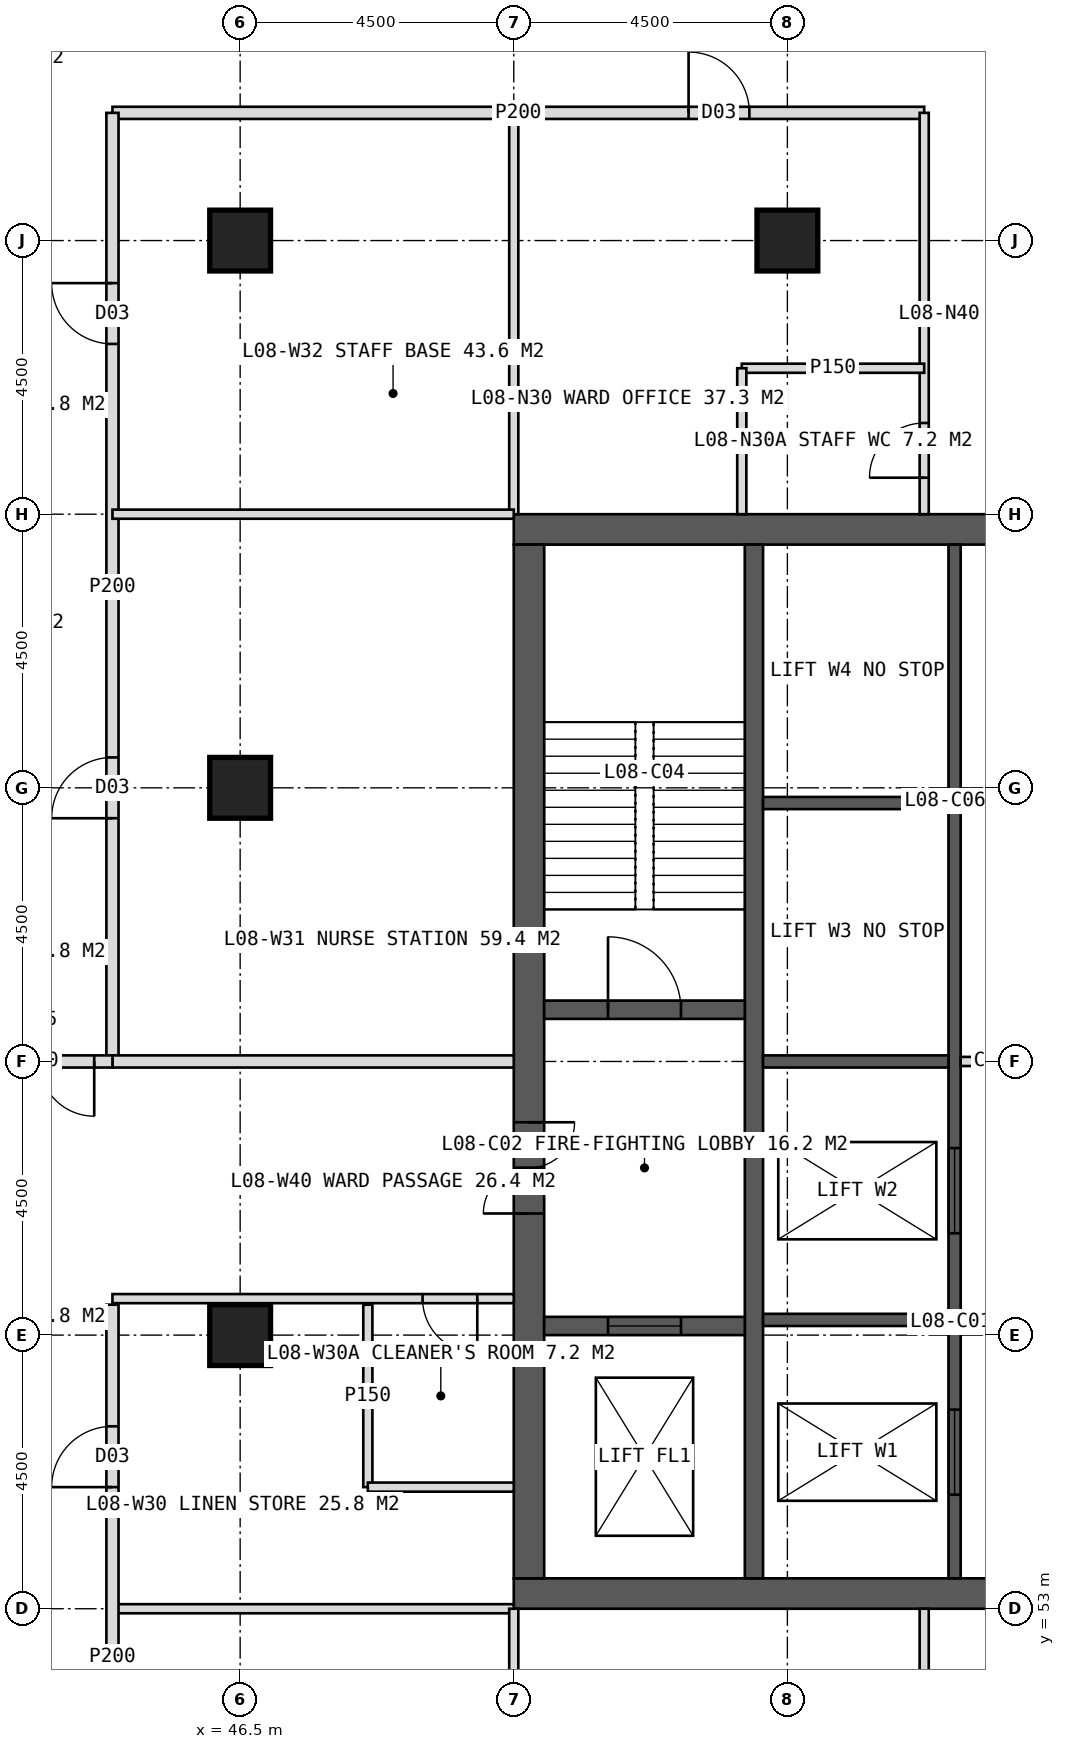
"""IFC4 building model, lengths in metres.
Left out: names, types, materials, properties, quantities, classifications, styles, units other than length and angle.
Written with IfcOpenShell. Run it as: python <this file> out.ifc"""

import sys

from ifc_helpers import new_model, si_unit, direction, frame, frame_2d, origin, origin_2d, place, context, subcontext, project, spatial, rectangle, hollow_rectangle, extrude, element, fill, save


model = new_model("IFC4")
c1 = context("Model", 3, precision=1e-05, world=origin(), true_north=direction((0.0, 1.0)))
c2 = subcontext(c1, "Body", "Model", "MODEL_VIEW")
j1 = project(units=[si_unit("LENGTHUNIT", "METRE"), si_unit("PLANEANGLEUNIT", "RADIAN")], contexts=[c1])
p1 = place(None, origin())
s1 = spatial("IfcSite", under=j1, at=p1, CompositionType="ELEMENT")
p2 = place(p1, origin())
s2 = spatial("IfcBuilding", under=s1, at=p2, CompositionType="ELEMENT")
p3 = place(p2, frame((0.0, 0.0, 39.0)))
s3 = spatial("IfcBuildingStorey", under=s2, at=p3, CompositionType="ELEMENT", Elevation=39.0)
p4 = place(p3, frame((51.0, 70.75, 0.0), z_axis=(0.0, 0.0, 1.0), x_axis=(1.0, 0.0, 0.0)))
e1 = element("IfcWall", 1, at=p4, inside=s3, PredefinedType="SHEAR", context=c2, shape_type="SweptSolid", body=[
    extrude(rectangle(XDim=18.0, YDim=0.5, at=frame_2d((9.0, 0.0))), origin(), (0.0, 0.0, 1.0), 4.0),
])
p5 = place(p4, frame((8.1, 0.0, 0.0)))
e2 = element("IfcOpeningElement", 2, at=p5, cuts=e1, PredefinedType="OPENING", context=c2, shape_type="SweptSolid", body=[
    extrude(rectangle(XDim=1.8, YDim=2.2, at=frame_2d((0.9, 1.1))), frame((0.0, 0.26, 0.0), z_axis=(0.0, -1.0, 0.0), x_axis=(1.0, 0.0, 0.0)), (0.0, 0.0, 1.0), 0.52),
])
p6 = place(p3, frame((51.0, 53.25, 0.0), z_axis=(0.0, 0.0, 1.0), x_axis=(1.0, 0.0, 0.0)))
e3 = element("IfcWall", 3, at=p6, inside=s3, PredefinedType="SHEAR", context=c2, shape_type="SweptSolid", body=[
    extrude(rectangle(XDim=18.0, YDim=0.5, at=frame_2d((9.0, 0.0))), origin(), (0.0, 0.0, 1.0), 4.0),
])
p7 = place(p6, frame((8.1, 0.0, 0.0)))
e4 = element("IfcOpeningElement", 4, at=p7, cuts=e3, PredefinedType="OPENING", context=c2, shape_type="SweptSolid", body=[
    extrude(rectangle(XDim=1.8, YDim=2.2, at=frame_2d((0.9, 1.1))), frame((0.0, 0.26, 0.0), z_axis=(0.0, -1.0, 0.0), x_axis=(1.0, 0.0, 0.0)), (0.0, 0.0, 1.0), 0.52),
])
p8 = place(p3, frame((51.25, 53.5, 0.0), z_axis=(0.0, 0.0, 1.0), x_axis=(0.0, 1.0, 0.0)))
e5 = element("IfcWall", 5, at=p8, inside=s3, PredefinedType="SHEAR", context=c2, shape_type="SweptSolid", body=[
    extrude(rectangle(XDim=17.0, YDim=0.5, at=frame_2d((8.5, 0.0))), origin(), (0.0, 0.0, 1.0), 4.0),
])
p9 = place(p8, frame((6.0, 0.0, 0.0)))
e6 = element("IfcOpeningElement", 6, at=p9, cuts=e5, PredefinedType="OPENING", context=c2, shape_type="SweptSolid", body=[
    extrude(rectangle(XDim=1.5, YDim=2.2, at=frame_2d((0.75, 1.1))), frame((0.0, 0.26, 0.0), z_axis=(0.0, -1.0, 0.0), x_axis=(1.0, 0.0, 0.0)), (0.0, 0.0, 1.0), 0.52),
])
p10 = place(p3, frame((54.95, 53.5, 0.0), z_axis=(0.0, 0.0, 1.0), x_axis=(0.0, 1.0, 0.0)))
e7 = element("IfcWall", 7, at=p10, inside=s3, PredefinedType="SHEAR", context=c2, shape_type="SweptSolid", body=[
    extrude(rectangle(XDim=17.0, YDim=0.3, at=frame_2d((8.5, 0.0))), origin(), (0.0, 0.0, 1.0), 4.0),
])
p11 = place(p3, frame((58.25, 53.5, 0.0), z_axis=(0.0, 0.0, 1.0), x_axis=(0.0, 1.0, 0.0)))
e8 = element("IfcWall", 8, at=p11, inside=s3, PredefinedType="SHEAR", context=c2, shape_type="SweptSolid", body=[
    extrude(rectangle(XDim=17.0, YDim=0.2, at=frame_2d((8.5, 0.0))), origin(), (0.0, 0.0, 1.0), 4.0),
])
p12 = place(p11, frame((1.375, 0.0, 0.0)))
e9 = element("IfcOpeningElement", 9, at=p12, cuts=e8, PredefinedType="OPENING", context=c2, shape_type="SweptSolid", body=[
    extrude(rectangle(XDim=1.4, YDim=2.2, at=frame_2d((0.7, 1.1))), frame((0.0, 0.11, 0.0), z_axis=(0.0, -1.0, 0.0), x_axis=(1.0, 0.0, 0.0)), (0.0, 0.0, 1.0), 0.22),
])
p13 = place(p11, frame((5.675, 0.0, 0.0)))
e10 = element("IfcOpeningElement", 10, at=p13, cuts=e8, PredefinedType="OPENING", context=c2, shape_type="SweptSolid", body=[
    extrude(rectangle(XDim=1.4, YDim=2.2, at=frame_2d((0.7, 1.1))), frame((0.0, 0.11, 0.0), z_axis=(0.0, -1.0, 0.0), x_axis=(1.0, 0.0, 0.0)), (0.0, 0.0, 1.0), 0.22),
])
for number, where, z_axis, x_axis in (
    (11, (55.1, 57.75, 0.0), (0.0, 0.0, 1.0), (1.0, 0.0, 0.0)),
    (12, (55.1, 62.0, 0.0), (0.0, 0.0, 1.0), (1.0, 0.0, 0.0)),
    (13, (55.1, 66.25, 0.0), (0.0, 0.0, 1.0), (1.0, 0.0, 0.0)),
):
    element("IfcWall", number, at=place(p3, frame(where, z_axis=z_axis, x_axis=x_axis)), inside=s3, PredefinedType="SHEAR", context=c2, shape_type="SweptSolid", body=[
        extrude(rectangle(XDim=3.05, YDim=0.2, at=frame_2d((1.525, 0.0))), origin(), (0.0, 0.0, 1.0), 4.0),
    ])
p14 = place(p3, frame((51.5, 62.85, 0.0), z_axis=(0.0, 0.0, 1.0), x_axis=(1.0, 0.0, 0.0)))
e14 = element("IfcWall", 14, at=p14, inside=s3, PredefinedType="SHEAR", context=c2, shape_type="SweptSolid", body=[
    extrude(rectangle(XDim=3.3, YDim=0.3, at=frame_2d((1.65, 0.0))), origin(), (0.0, 0.0, 1.0), 4.0),
])
p15 = place(p14, frame((1.05, 0.0, 0.0)))
e15 = element("IfcOpeningElement", 15, at=p15, cuts=e14, PredefinedType="OPENING", context=c2, shape_type="SweptSolid", body=[
    extrude(rectangle(XDim=1.2, YDim=2.1, at=frame_2d((0.6, 1.05))), frame((0.0, 0.16, 0.0), z_axis=(0.0, -1.0, 0.0), x_axis=(1.0, 0.0, 0.0)), (0.0, 0.0, 1.0), 0.32),
])
p16 = place(p3, frame((51.5, 57.65, 0.0), z_axis=(0.0, 0.0, 1.0), x_axis=(1.0, 0.0, 0.0)))
e16 = element("IfcWall", 16, at=p16, inside=s3, PredefinedType="SHEAR", context=c2, shape_type="SweptSolid", body=[
    extrude(rectangle(XDim=3.3, YDim=0.3, at=frame_2d((1.65, 0.0))), origin(), (0.0, 0.0, 1.0), 4.0),
])
p17 = place(p16, frame((1.05, 0.0, 0.0)))
e17 = element("IfcOpeningElement", 17, at=p17, cuts=e16, PredefinedType="OPENING", context=c2, shape_type="SweptSolid", body=[
    extrude(rectangle(XDim=1.2, YDim=2.2, at=frame_2d((0.6, 1.1))), frame((0.0, 0.16, 0.0), z_axis=(0.0, -1.0, 0.0), x_axis=(1.0, 0.0, 0.0)), (0.0, 0.0, 1.0), 0.32),
])
for number, where, z_axis, x_axis in (
    (18, (46.5, 75.5, 0.0), (0.0, 0.0, 1.0), (1.0, 0.0, 0.0)),
    (19, (55.5, 75.5, 0.0), (0.0, 0.0, 1.0), (1.0, 0.0, 0.0)),
    (20, (46.5, 57.5, 0.0), (0.0, 0.0, 1.0), (1.0, 0.0, 0.0)),
    (21, (46.5, 66.5, 0.0), (0.0, 0.0, 1.0), (1.0, 0.0, 0.0)),
):
    element("IfcColumn", number, at=place(p3, frame(where, z_axis=z_axis, x_axis=x_axis)), inside=s3, PredefinedType="COLUMN", context=c2, shape_type="SweptSolid", body=[
        extrude(hollow_rectangle(XDim=1.0, YDim=1.0, WallThickness=0.1, at=origin_2d()), origin(), (0.0, 0.0, 1.0), 4.0),
    ])
p18 = place(p3, frame((51.0, 71.0, 0.0), z_axis=(0.0, 0.0, 1.0), x_axis=(0.0, 1.0, 0.0)))
e22 = element("IfcWall", 22, at=p18, inside=s3, PredefinedType="PARTITIONING", context=c2, shape_type="SweptSolid", body=[
    extrude(rectangle(XDim=6.6, YDim=0.15, at=frame_2d((3.3, 0.0))), origin(), (0.0, 0.0, 1.0), 3.75),
])
p19 = place(p3, frame((44.4, 77.6, 0.0), z_axis=(0.0, 0.0, 1.0), x_axis=(1.0, 0.0, 0.0)))
e23 = element("IfcWall", 23, at=p19, inside=s3, PredefinedType="PARTITIONING", context=c2, shape_type="SweptSolid", body=[
    extrude(rectangle(XDim=13.35, YDim=0.2, at=frame_2d((6.675, 0.0))), origin(), (0.0, 0.0, 1.0), 3.75),
])
p20 = place(p19, frame((9.475, 0.0, 0.0)))
e24 = element("IfcOpeningElement", 24, at=p20, cuts=e23, PredefinedType="OPENING", context=c2, shape_type="SweptSolid", body=[
    extrude(rectangle(XDim=1.0, YDim=2.1, at=frame_2d((0.5, 1.05))), frame((0.0, 0.11, 0.0), z_axis=(0.0, -1.0, 0.0), x_axis=(1.0, 0.0, 0.0)), (0.0, 0.0, 1.0), 0.22),
])
p21 = place(p3, frame((57.75, 71.0, 0.0), z_axis=(0.0, 0.0, 1.0), x_axis=(0.0, 1.0, 0.0)))
e25 = element("IfcWall", 25, at=p21, inside=s3, PredefinedType="PARTITIONING", context=c2, shape_type="SweptSolid", body=[
    extrude(rectangle(XDim=6.6, YDim=0.15, at=frame_2d((3.3, 0.0))), origin(), (0.0, 0.0, 1.0), 3.75),
])
p22 = place(p21, frame((0.6, 0.0, 0.0)))
e26 = element("IfcOpeningElement", 26, at=p22, cuts=e25, PredefinedType="OPENING", context=c2, shape_type="SweptSolid", body=[
    extrude(rectangle(XDim=0.9, YDim=2.1, at=frame_2d((0.45, 1.05))), frame((0.0, 0.085, 0.0), z_axis=(0.0, -1.0, 0.0), x_axis=(1.0, 0.0, 0.0)), (0.0, 0.0, 1.0), 0.17),
])
p23 = place(p3, frame((54.75, 73.4, 0.0), z_axis=(0.0, 0.0, 1.0), x_axis=(1.0, 0.0, 0.0)))
e27 = element("IfcWall", 27, at=p23, inside=s3, PredefinedType="PARTITIONING", context=c2, shape_type="SweptSolid", body=[
    extrude(rectangle(XDim=3.0, YDim=0.15, at=frame_2d((1.5, 0.0))), origin(), (0.0, 0.0, 1.0), 3.75),
])
p24 = place(p3, frame((54.75, 71.0, 0.0), z_axis=(0.0, 0.0, 1.0), x_axis=(0.0, 1.0, 0.0)))
e28 = element("IfcWall", 28, at=p24, inside=s3, PredefinedType="PARTITIONING", context=c2, shape_type="SweptSolid", body=[
    extrude(rectangle(XDim=2.4, YDim=0.15, at=frame_2d((1.2, 0.0))), origin(), (0.0, 0.0, 1.0), 3.75),
])
p25 = place(p3, frame((51.0, 53.0, 0.0), z_axis=(0.0, 0.0, 1.0), x_axis=(-1.0, 0.0, 0.0)))
e29 = element("IfcWall", 29, at=p25, inside=s3, PredefinedType="PARTITIONING", context=c2, shape_type="SweptSolid", body=[
    extrude(rectangle(XDim=6.6, YDim=0.15, at=frame_2d((3.3, 0.0))), origin(), (0.0, 0.0, 1.0), 3.75),
])
p26 = place(p3, frame((44.4, 46.4, 0.0), z_axis=(0.0, 0.0, 1.0), x_axis=(0.0, 1.0, 0.0)))
e30 = element("IfcWall", 30, at=p26, inside=s3, PredefinedType="PARTITIONING", context=c2, shape_type="SweptSolid", body=[
    extrude(rectangle(XDim=11.6, YDim=0.2, at=frame_2d((5.8, 0.0))), origin(), (0.0, 0.0, 1.0), 3.75),
])
p27 = place(p26, frame((8.6, 0.0, 0.0)))
e31 = element("IfcOpeningElement", 31, at=p27, cuts=e30, PredefinedType="OPENING", context=c2, shape_type="SweptSolid", body=[
    extrude(rectangle(XDim=1.0, YDim=2.1, at=frame_2d((0.5, 1.05))), frame((0.0, 0.11, 0.0), z_axis=(0.0, -1.0, 0.0), x_axis=(1.0, 0.0, 0.0)), (0.0, 0.0, 1.0), 0.22),
])
p28 = place(p3, frame((44.4, 62.0, 0.0), z_axis=(0.0, 0.0, 1.0), x_axis=(0.0, 1.0, 0.0)))
e32 = element("IfcWall", 32, at=p28, inside=s3, PredefinedType="PARTITIONING", context=c2, shape_type="SweptSolid", body=[
    extrude(rectangle(XDim=15.6, YDim=0.2, at=frame_2d((7.8, 0.0))), origin(), (0.0, 0.0, 1.0), 3.75),
])
p29 = place(p28, frame((4.0, 0.0, 0.0)))
e33 = element("IfcOpeningElement", 33, at=p29, cuts=e32, PredefinedType="OPENING", context=c2, shape_type="SweptSolid", body=[
    extrude(rectangle(XDim=1.0, YDim=2.1, at=frame_2d((0.5, 1.05))), frame((0.0, 0.11, 0.0), z_axis=(0.0, -1.0, 0.0), x_axis=(1.0, 0.0, 0.0)), (0.0, 0.0, 1.0), 0.22),
])
p30 = place(p28, frame((11.8, 0.0, 0.0)))
e34 = element("IfcOpeningElement", 34, at=p30, cuts=e32, PredefinedType="OPENING", context=c2, shape_type="SweptSolid", body=[
    extrude(rectangle(XDim=1.0, YDim=2.1, at=frame_2d((0.5, 1.05))), frame((0.0, 0.11, 0.0), z_axis=(0.0, -1.0, 0.0), x_axis=(1.0, 0.0, 0.0)), (0.0, 0.0, 1.0), 0.22),
])
p31 = place(p3, frame((51.0, 58.1, 0.0), z_axis=(0.0, 0.0, 1.0), x_axis=(-1.0, 0.0, 0.0)))
e35 = element("IfcWall", 35, at=p31, inside=s3, PredefinedType="PARTITIONING", context=c2, shape_type="SweptSolid", body=[
    extrude(rectangle(XDim=6.6, YDim=0.15, at=frame_2d((3.3, 0.0))), origin(), (0.0, 0.0, 1.0), 3.75),
])
p32 = place(p31, frame((0.6, 0.0, 0.0)))
e36 = element("IfcOpeningElement", 36, at=p32, cuts=e35, PredefinedType="OPENING", context=c2, shape_type="SweptSolid", body=[
    extrude(rectangle(XDim=0.9, YDim=2.1, at=frame_2d((0.45, 1.05))), frame((0.0, 0.085, 0.0), z_axis=(0.0, -1.0, 0.0), x_axis=(1.0, 0.0, 0.0)), (0.0, 0.0, 1.0), 0.17),
])
p33 = place(p3, frame((51.0, 62.0, 0.0), z_axis=(0.0, 0.0, 1.0), x_axis=(-1.0, 0.0, 0.0)))
e37 = element("IfcWall", 37, at=p33, inside=s3, PredefinedType="SOLIDWALL", context=c2, shape_type="SweptSolid", body=[
    extrude(rectangle(XDim=6.6, YDim=0.2, at=frame_2d((3.3, 0.0))), origin(), (0.0, 0.0, 1.0), 2.75),
])
p34 = place(p3, frame((51.0, 71.0, 0.0), z_axis=(0.0, 0.0, 1.0), x_axis=(-1.0, 0.0, 0.0)))
e38 = element("IfcWall", 38, at=p34, inside=s3, PredefinedType="PARTITIONING", context=c2, shape_type="SweptSolid", body=[
    extrude(rectangle(XDim=6.6, YDim=0.15, at=frame_2d((3.3, 0.0))), origin(), (0.0, 0.0, 1.0), 3.75),
])
p35 = place(p3, frame((48.6, 55.0, 0.0), z_axis=(0.0, 0.0, 1.0), x_axis=(0.0, 1.0, 0.0)))
e39 = element("IfcWall", 39, at=p35, inside=s3, PredefinedType="PARTITIONING", context=c2, shape_type="SweptSolid", body=[
    extrude(rectangle(XDim=3.0, YDim=0.15, at=frame_2d((1.5, 0.0))), origin(), (0.0, 0.0, 1.0), 3.75),
])
p36 = place(p3, frame((51.0, 55.0, 0.0), z_axis=(0.0, 0.0, 1.0), x_axis=(-1.0, 0.0, 0.0)))
e40 = element("IfcWall", 40, at=p36, inside=s3, PredefinedType="PARTITIONING", context=c2, shape_type="SweptSolid", body=[
    extrude(rectangle(XDim=2.4, YDim=0.15, at=frame_2d((1.2, 0.0))), origin(), (0.0, 0.0, 1.0), 3.75),
])
for number, where, z_axis, x_axis in (
    (41, (57.75, 53.0, 0.0), (0.0, 0.0, 1.0), (0.0, -1.0, 0.0)),
    (42, (51.0, 53.0, 0.0), (0.0, 0.0, 1.0), (0.0, -1.0, 0.0)),
):
    element("IfcWall", number, at=place(p3, frame(where, z_axis=z_axis, x_axis=x_axis)), inside=s3, PredefinedType="PARTITIONING", context=c2, shape_type="SweptSolid", body=[
        extrude(rectangle(XDim=6.6, YDim=0.15, at=frame_2d((3.3, 0.0))), origin(), (0.0, 0.0, 1.0), 3.75),
    ])
p37 = place(p3, frame((44.4, 62.0, 0.0), z_axis=(0.0, 0.0, 1.0), x_axis=(-1.0, 0.0, 0.0)))
e43 = element("IfcWall", 43, at=p37, inside=s3, PredefinedType="SOLIDWALL", context=c2, shape_type="SweptSolid", body=[
    extrude(rectangle(XDim=2.7, YDim=0.2, at=frame_2d((1.35, 0.0))), origin(), (0.0, 0.0, 1.0), 2.75),
])
p38 = place(p37, frame((0.3, 0.0, 0.0)))
e44 = element("IfcOpeningElement", 44, at=p38, cuts=e43, PredefinedType="OPENING", context=c2, shape_type="SweptSolid", body=[
    extrude(rectangle(XDim=1.8, YDim=2.2, at=frame_2d((0.9, 1.1))), frame((0.0, 0.11, 0.0), z_axis=(0.0, -1.0, 0.0), x_axis=(1.0, 0.0, 0.0)), (0.0, 0.0, 1.0), 0.22),
])
p39 = place(p3, frame((58.35, 62.0, 0.0), z_axis=(0.0, 0.0, 1.0), x_axis=(1.0, 0.0, 0.0)))
e45 = element("IfcWall", 45, at=p39, inside=s3, PredefinedType="PARTITIONING", context=c2, shape_type="SweptSolid", body=[
    extrude(rectangle(XDim=3.3, YDim=0.15, at=frame_2d((1.65, 0.0))), origin(), (0.0, 0.0, 1.0), 3.75),
])
p40 = place(p39, frame((1.15, 0.0, 0.0)))
e46 = element("IfcOpeningElement", 46, at=p40, cuts=e45, PredefinedType="OPENING", context=c2, shape_type="SweptSolid", body=[
    extrude(rectangle(XDim=1.0, YDim=2.1, at=frame_2d((0.5, 1.05))), frame((0.0, 0.085, 0.0), z_axis=(0.0, -1.0, 0.0), x_axis=(1.0, 0.0, 0.0)), (0.0, 0.0, 1.0), 0.17),
])
p41 = place(p22, origin())
e47 = element("IfcDoor", 47, at=p41, inside=s3, OperationType="SINGLE_SWING_LEFT", PredefinedType="DOOR", context=c2, shape_type="SweptSolid", body=[
    extrude(rectangle(XDim=0.9, YDim=2.1, at=frame_2d((0.45, 1.05))), frame((0.0, 0.025, 0.0), z_axis=(0.0, -1.0, 0.0), x_axis=(1.0, 0.0, 0.0)), (0.0, 0.0, 1.0), 0.05),
])
fill(e26, e47)
p42 = place(p20, origin())
e48 = element("IfcDoor", 48, at=p42, inside=s3, OperationType="SINGLE_SWING_LEFT", PredefinedType="DOOR", context=c2, shape_type="SweptSolid", body=[
    extrude(rectangle(XDim=1.0, YDim=2.1, at=frame_2d((0.5, 1.05))), frame((0.0, 0.025, 0.0), z_axis=(0.0, -1.0, 0.0), x_axis=(1.0, 0.0, 0.0)), (0.0, 0.0, 1.0), 0.05),
])
fill(e24, e48)
p43 = place(p32, origin())
e49 = element("IfcDoor", 49, at=p43, inside=s3, OperationType="SINGLE_SWING_LEFT", PredefinedType="DOOR", context=c2, shape_type="SweptSolid", body=[
    extrude(rectangle(XDim=0.9, YDim=2.1, at=frame_2d((0.45, 1.05))), frame((0.0, 0.025, 0.0), z_axis=(0.0, -1.0, 0.0), x_axis=(1.0, 0.0, 0.0)), (0.0, 0.0, 1.0), 0.05),
])
fill(e36, e49)
p44 = place(p27, origin())
e50 = element("IfcDoor", 50, at=p44, inside=s3, OperationType="SINGLE_SWING_LEFT", PredefinedType="DOOR", context=c2, shape_type="SweptSolid", body=[
    extrude(rectangle(XDim=1.0, YDim=2.1, at=frame_2d((0.5, 1.05))), frame((0.0, 0.025, 0.0), z_axis=(0.0, -1.0, 0.0), x_axis=(1.0, 0.0, 0.0)), (0.0, 0.0, 1.0), 0.05),
])
fill(e31, e50)
p45 = place(p29, origin())
e51 = element("IfcDoor", 51, at=p45, inside=s3, OperationType="SINGLE_SWING_LEFT", PredefinedType="DOOR", context=c2, shape_type="SweptSolid", body=[
    extrude(rectangle(XDim=1.0, YDim=2.1, at=frame_2d((0.5, 1.05))), frame((0.0, 0.025, 0.0), z_axis=(0.0, -1.0, 0.0), x_axis=(1.0, 0.0, 0.0)), (0.0, 0.0, 1.0), 0.05),
])
fill(e33, e51)
p46 = place(p30, origin())
e52 = element("IfcDoor", 52, at=p46, inside=s3, OperationType="SINGLE_SWING_RIGHT", PredefinedType="DOOR", context=c2, shape_type="SweptSolid", body=[
    extrude(rectangle(XDim=1.0, YDim=2.1, at=frame_2d((0.5, 1.05))), frame((0.0, 0.025, 0.0), z_axis=(0.0, -1.0, 0.0), x_axis=(1.0, 0.0, 0.0)), (0.0, 0.0, 1.0), 0.05),
])
fill(e34, e52)
p47 = place(p38, origin())
e53 = element("IfcDoor", 53, at=p47, inside=s3, OperationType="DOUBLE_DOOR_DOUBLE_SWING", PredefinedType="DOOR", context=c2, shape_type="SweptSolid", body=[
    extrude(rectangle(XDim=1.8, YDim=2.2, at=frame_2d((0.9, 1.1))), frame((0.0, 0.025, 0.0), z_axis=(0.0, -1.0, 0.0), x_axis=(1.0, 0.0, 0.0)), (0.0, 0.0, 1.0), 0.05),
])
fill(e44, e53)
p48 = place(p9, origin())
e54 = element("IfcDoor", 54, at=p48, inside=s3, OperationType="DOUBLE_DOOR_SINGLE_SWING", PredefinedType="DOOR", context=c2, shape_type="SweptSolid", body=[
    extrude(rectangle(XDim=1.5, YDim=2.2, at=frame_2d((0.75, 1.1))), frame((0.0, 0.025, 0.0), z_axis=(0.0, -1.0, 0.0), x_axis=(1.0, 0.0, 0.0)), (0.0, 0.0, 1.0), 0.05),
])
fill(e6, e54)
p49 = place(p15, origin())
e55 = element("IfcDoor", 55, at=p49, inside=s3, OperationType="SINGLE_SWING_LEFT", PredefinedType="DOOR", context=c2, shape_type="SweptSolid", body=[
    extrude(rectangle(XDim=1.2, YDim=2.1, at=frame_2d((0.6, 1.05))), frame((0.0, 0.025, 0.0), z_axis=(0.0, -1.0, 0.0), x_axis=(1.0, 0.0, 0.0)), (0.0, 0.0, 1.0), 0.05),
])
fill(e15, e55)
p50 = place(p17, origin())
e56 = element("IfcDoor", 56, at=p50, inside=s3, OperationType="SLIDING_TO_LEFT", PredefinedType="DOOR", context=c2, shape_type="SweptSolid", body=[
    extrude(rectangle(XDim=1.2, YDim=2.2, at=frame_2d((0.6, 1.1))), frame((0.0, 0.025, 0.0), z_axis=(0.0, -1.0, 0.0), x_axis=(1.0, 0.0, 0.0)), (0.0, 0.0, 1.0), 0.05),
])
fill(e17, e56)
p51 = place(p12, origin())
e57 = element("IfcDoor", 57, at=p51, inside=s3, OperationType="SLIDING_TO_LEFT", PredefinedType="DOOR", context=c2, shape_type="SweptSolid", body=[
    extrude(rectangle(XDim=1.4, YDim=2.2, at=frame_2d((0.7, 1.1))), frame((0.0, 0.025, 0.0), z_axis=(0.0, -1.0, 0.0), x_axis=(1.0, 0.0, 0.0)), (0.0, 0.0, 1.0), 0.05),
])
fill(e9, e57)
p52 = place(p13, origin())
e58 = element("IfcDoor", 58, at=p52, inside=s3, OperationType="SLIDING_TO_LEFT", PredefinedType="DOOR", context=c2, shape_type="SweptSolid", body=[
    extrude(rectangle(XDim=1.4, YDim=2.2, at=frame_2d((0.7, 1.1))), frame((0.0, 0.025, 0.0), z_axis=(0.0, -1.0, 0.0), x_axis=(1.0, 0.0, 0.0)), (0.0, 0.0, 1.0), 0.05),
])
fill(e10, e58)
save(model, sys.argv[1])
